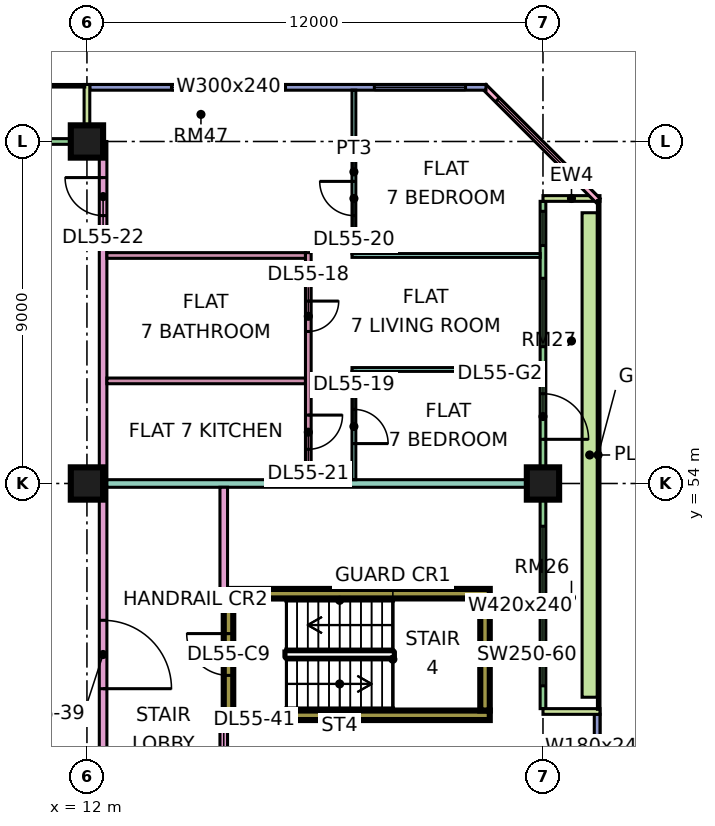
"""IFC4 building model, lengths in metres.
Left out: names, types, materials, properties, quantities, classifications, styles, units other than length and angle.
Written with IfcOpenShell. Run it as: python <this file> out.ifc"""

import sys

from ifc_helpers import new_model, si_unit, direction, frame, frame_2d, origin, origin_2d, place, context, subcontext, project, spatial, rectangle, extrude, element, fill, save


model = new_model("IFC4")
c1 = context("Model", 3, precision=1e-05, world=origin(), true_north=direction((0.0, 1.0)))
c2 = subcontext(c1, "Body", "Model", "MODEL_VIEW")
j1 = project(units=[si_unit("LENGTHUNIT", "METRE"), si_unit("PLANEANGLEUNIT", "RADIAN")], contexts=[c1])
p1 = place(None, origin())
s1 = spatial("IfcSite", under=j1, at=p1, CompositionType="ELEMENT")
p2 = place(p1, origin())
s2 = spatial("IfcBuilding", under=s1, at=p2, CompositionType="ELEMENT")
p3 = place(p2, frame((0.0, 0.0, 234.15)))
s3 = spatial("IfcBuildingStorey", under=s2, at=p3, CompositionType="ELEMENT", Elevation=234.15)
for number, where, z_axis, x_axis in (
    (1, (12.0, 54.0, 0.0), (0.0, 0.0, 1.0), (1.0, 0.0, 0.0)),
    (2, (12.0, 63.0, 0.0), (0.0, 0.0, 1.0), (1.0, 0.0, 0.0)),
    (3, (24.0, 54.0, 0.0), (0.0, 0.0, 1.0), (1.0, 0.0, 0.0)),
):
    element("IfcColumn", number, at=place(p3, frame(where, z_axis=z_axis, x_axis=x_axis)), inside=s3, PredefinedType="COLUMN", context=c2, shape_type="SweptSolid", body=[
        extrude(rectangle(XDim=0.85, YDim=0.85, at=origin_2d()), origin(), (0.0, 0.0, 1.0), 3.75),
    ])
for number, where, z_axis, x_axis in (
    (4, (15.6, 47.9, 0.0), (0.0, 0.0, 1.0), (1.0, 0.0, 0.0)),
    (5, (15.6, 51.1, 0.0), (0.0, 0.0, 1.0), (1.0, 0.0, 0.0)),
):
    element("IfcWall", number, at=place(p3, frame(where, z_axis=z_axis, x_axis=x_axis)), inside=s3, PredefinedType="SHEAR", context=c2, shape_type="SweptSolid", body=[
        extrude(rectangle(XDim=7.0, YDim=0.25, at=frame_2d((3.5, 0.0))), origin(), (0.0, 0.0, 1.0), 3.75),
    ])
p4 = place(p3, frame((15.725, 48.025, 0.0), z_axis=(0.0, 0.0, 1.0), x_axis=(0.0, 1.0, 0.0)))
e6 = element("IfcWall", 6, at=p4, inside=s3, PredefinedType="SHEAR", context=c2, shape_type="SweptSolid", body=[
    extrude(rectangle(XDim=2.95, YDim=0.25, at=frame_2d((1.475, 0.0))), origin(), (0.0, 0.0, 1.0), 3.75),
])
p5 = place(p4, frame((0.925, 0.0, 0.0)))
e7 = element("IfcOpeningElement", 7, at=p5, cuts=e6, PredefinedType="OPENING", context=c2, shape_type="SweptSolid", body=[
    extrude(rectangle(XDim=1.1, YDim=2.2, at=frame_2d((0.55, 1.1))), frame((0.0, 0.135, 0.0), z_axis=(0.0, -1.0, 0.0), x_axis=(1.0, 0.0, 0.0)), (0.0, 0.0, 1.0), 0.27),
])
p6 = place(p3, frame((22.475, 48.025, 0.0), z_axis=(0.0, 0.0, 1.0), x_axis=(0.0, 1.0, 0.0)))
e8 = element("IfcWall", 8, at=p6, inside=s3, PredefinedType="SHEAR", context=c2, shape_type="SweptSolid", body=[
    extrude(rectangle(XDim=2.95, YDim=0.25, at=frame_2d((1.475, 0.0))), origin(), (0.0, 0.0, 1.0), 3.75),
])
p7 = place(p3, frame((25.425, 40.5, 0.0), z_axis=(0.0, 0.0, 1.0), x_axis=(0.0, 1.0, 0.0)))
e9 = element("IfcWall", 9, at=p7, inside=s3, PredefinedType="SOLIDWALL", context=c2, shape_type="SweptSolid", body=[
    extrude(rectangle(XDim=7.425, YDim=0.15, at=frame_2d((3.712, 0.0))), origin(), (0.0, 0.0, 1.0), 3.35),
])
p8 = place(p7, frame((0.3, 0.0, 0.45)))
e10 = element("IfcOpeningElement", 10, at=p8, cuts=e9, PredefinedType="OPENING", context=c2, shape_type="SweptSolid", body=[
    extrude(rectangle(XDim=0.9, YDim=2.4, at=frame_2d((0.45, 1.2))), frame((0.0, 0.085, 0.0), z_axis=(0.0, -1.0, 0.0), x_axis=(1.0, 0.0, 0.0)), (0.0, 0.0, 1.0), 0.17),
])
p9 = place(p7, frame((2.1, 0.0, 0.45)))
e11 = element("IfcOpeningElement", 11, at=p9, cuts=e9, PredefinedType="OPENING", context=c2, shape_type="SweptSolid", body=[
    extrude(rectangle(XDim=1.8, YDim=2.4, at=frame_2d((0.9, 1.2))), frame((0.0, 0.085, 0.0), z_axis=(0.0, -1.0, 0.0), x_axis=(1.0, 0.0, 0.0)), (0.0, 0.0, 1.0), 0.17),
])
p10 = place(p7, frame((5.062, 0.0, 0.45)))
e12 = element("IfcOpeningElement", 12, at=p10, cuts=e9, PredefinedType="OPENING", context=c2, shape_type="SweptSolid", body=[
    extrude(rectangle(XDim=1.8, YDim=2.4, at=frame_2d((0.9, 1.2))), frame((0.0, 0.085, 0.0), z_axis=(0.0, -1.0, 0.0), x_axis=(1.0, 0.0, 0.0)), (0.0, 0.0, 1.0), 0.17),
])
p11 = place(p3, frame((24.0, 48.075, 0.0), z_axis=(0.0, 0.0, 1.0), x_axis=(0.0, 1.0, 0.0)))
e13 = element("IfcWall", 13, at=p11, inside=s3, PredefinedType="SOLIDWALL", context=c2, shape_type="SweptSolid", body=[
    extrude(rectangle(XDim=13.35, YDim=0.15, at=frame_2d((6.675, 0.0))), origin(), (0.0, 0.0, 1.0), 3.35),
])
p12 = place(p11, frame((0.6, 0.0, 0.45)))
e14 = element("IfcOpeningElement", 14, at=p12, cuts=e13, PredefinedType="OPENING", context=c2, shape_type="SweptSolid", body=[
    extrude(rectangle(XDim=4.2, YDim=2.4, at=frame_2d((2.1, 1.2))), frame((0.0, 0.085, 0.0), z_axis=(0.0, -1.0, 0.0), x_axis=(1.0, 0.0, 0.0)), (0.0, 0.0, 1.0), 0.17),
])
p13 = place(p11, frame((7.087, 0.0, 0.0)))
e15 = element("IfcOpeningElement", 15, at=p13, cuts=e13, PredefinedType="OPENING", context=c2, shape_type="SweptSolid", body=[
    extrude(rectangle(XDim=1.2, YDim=2.4, at=frame_2d((0.6, 1.2))), frame((0.0, 0.085, 0.0), z_axis=(0.0, -1.0, 0.0), x_axis=(1.0, 0.0, 0.0)), (0.0, 0.0, 1.0), 0.17),
])
p14 = place(p11, frame((9.525, 0.0, 0.45)))
e16 = element("IfcOpeningElement", 16, at=p14, cuts=e13, PredefinedType="OPENING", context=c2, shape_type="SweptSolid", body=[
    extrude(rectangle(XDim=1.8, YDim=2.4, at=frame_2d((0.9, 1.2))), frame((0.0, 0.085, 0.0), z_axis=(0.0, -1.0, 0.0), x_axis=(1.0, 0.0, 0.0)), (0.0, 0.0, 1.0), 0.17),
])
p15 = place(p11, frame((12.188, 0.0, 0.45)))
e17 = element("IfcOpeningElement", 17, at=p15, cuts=e13, PredefinedType="OPENING", context=c2, shape_type="SweptSolid", body=[
    extrude(rectangle(XDim=0.9, YDim=2.4, at=frame_2d((0.45, 1.2))), frame((0.0, 0.085, 0.0), z_axis=(0.0, -1.0, 0.0), x_axis=(1.0, 0.0, 0.0)), (0.0, 0.0, 1.0), 0.17),
])
for number, where, z_axis, x_axis in (
    (18, (25.5, 48.0, 0.0), (0.0, 0.0, 1.0), (-1.0, 0.0, 0.0)),
    (19, (25.5, 61.5, 0.0), (0.0, 0.0, 1.0), (-1.0, 0.0, 0.0)),
):
    element("IfcWall", number, at=place(p3, frame(where, z_axis=z_axis, x_axis=x_axis)), inside=s3, PredefinedType="SOLIDWALL", context=c2, shape_type="SweptSolid", body=[
        extrude(rectangle(XDim=1.5, YDim=0.15, at=frame_2d((0.75, 0.0))), origin(), (0.0, 0.0, 1.0), 3.35),
    ])
p16 = place(p3, frame((25.447, 61.447, 0.0), z_axis=(0.0, 0.0, 1.0), x_axis=(-0.707106781187, 0.707106781187, 0.0)))
e20 = element("IfcWall", 20, at=p16, inside=s3, PredefinedType="SOLIDWALL", context=c2, shape_type="SweptSolid", body=[
    extrude(rectangle(XDim=4.243, YDim=0.15, at=frame_2d((2.121, 0.0))), origin(), (0.0, 0.0, 1.0), 3.35),
])
p17 = place(p16, frame((0.744, 0.0, 0.45)))
e21 = element("IfcOpeningElement", 21, at=p17, cuts=e20, PredefinedType="OPENING", context=c2, shape_type="SweptSolid", body=[
    extrude(rectangle(XDim=3.0, YDim=2.4, at=frame_2d((1.5, 1.2))), frame((0.0, 0.085, 0.0), z_axis=(0.0, -1.0, 0.0), x_axis=(1.0, 0.0, 0.0)), (0.0, 0.0, 1.0), 0.17),
])
p18 = place(p3, frame((22.5, 64.425, 0.0), z_axis=(0.0, 0.0, 1.0), x_axis=(-1.0, 0.0, 0.0)))
e22 = element("IfcWall", 22, at=p18, inside=s3, PredefinedType="SOLIDWALL", context=c2, shape_type="SweptSolid", body=[
    extrude(rectangle(XDim=10.425, YDim=0.15, at=frame_2d((5.212, 0.0))), origin(), (0.0, 0.0, 1.0), 3.35),
])
p19 = place(p18, frame((0.538, 0.0, 0.45)))
e23 = element("IfcOpeningElement", 23, at=p19, cuts=e22, PredefinedType="OPENING", context=c2, shape_type="SweptSolid", body=[
    extrude(rectangle(XDim=2.4, YDim=2.4, at=frame_2d((1.2, 1.2))), frame((0.0, 0.085, 0.0), z_axis=(0.0, -1.0, 0.0), x_axis=(1.0, 0.0, 0.0)), (0.0, 0.0, 1.0), 0.17),
])
p20 = place(p18, frame((5.275, 0.0, 0.45)))
e24 = element("IfcOpeningElement", 24, at=p20, cuts=e22, PredefinedType="OPENING", context=c2, shape_type="SweptSolid", body=[
    extrude(rectangle(XDim=3.0, YDim=2.4, at=frame_2d((1.5, 1.2))), frame((0.0, 0.085, 0.0), z_axis=(0.0, -1.0, 0.0), x_axis=(1.0, 0.0, 0.0)), (0.0, 0.0, 1.0), 0.17),
])
p21 = place(p3, frame((11.925, 63.0, 0.0), z_axis=(0.0, 0.0, 1.0), x_axis=(-1.0, 0.0, 0.0)))
e25 = element("IfcWall", 25, at=p21, inside=s3, PredefinedType="SOLIDWALL", context=c2, shape_type="SweptSolid", body=[
    extrude(rectangle(XDim=10.35, YDim=0.15, at=frame_2d((5.175, 0.0))), origin(), (0.0, 0.0, 1.0), 3.35),
])
p22 = place(p21, frame((2.775, 0.0, 0.45)))
e26 = element("IfcOpeningElement", 26, at=p22, cuts=e25, PredefinedType="OPENING", context=c2, shape_type="SweptSolid", body=[
    extrude(rectangle(XDim=2.4, YDim=2.4, at=frame_2d((1.2, 1.2))), frame((0.0, 0.085, 0.0), z_axis=(0.0, -1.0, 0.0), x_axis=(1.0, 0.0, 0.0)), (0.0, 0.0, 1.0), 0.17),
])
p23 = place(p21, frame((7.087, 0.0, 0.0)))
e27 = element("IfcOpeningElement", 27, at=p23, cuts=e25, PredefinedType="OPENING", context=c2, shape_type="SweptSolid", body=[
    extrude(rectangle(XDim=1.8, YDim=2.4, at=frame_2d((0.9, 1.2))), frame((0.0, 0.085, 0.0), z_axis=(0.0, -1.0, 0.0), x_axis=(1.0, 0.0, 0.0)), (0.0, 0.0, 1.0), 0.17),
])
p24 = place(p3, frame((12.0, 64.5, 0.0), z_axis=(0.0, 0.0, 1.0), x_axis=(0.0, -1.0, 0.0)))
e28 = element("IfcWall", 28, at=p24, inside=s3, PredefinedType="SOLIDWALL", context=c2, shape_type="SweptSolid", body=[
    extrude(rectangle(XDim=1.5, YDim=0.15, at=frame_2d((0.75, 0.0))), origin(), (0.0, 0.0, 1.0), 3.35),
])
p25 = place(p3, frame((25.229, 48.375, 0.0), z_axis=(0.0, 0.0, 1.0), x_axis=(0.0, 1.0, 0.0)))
e29 = element("IfcWall", 29, at=p25, inside=s3, PredefinedType="SOLIDWALL", context=c2, shape_type="SweptSolid", body=[
    extrude(rectangle(XDim=12.75, YDim=0.4, at=frame_2d((6.375, 0.0))), origin(), (0.0, 0.0, 1.0), 0.7),
])
p26 = place(p3, frame((12.425, 20.0, 0.0), z_axis=(0.0, 0.0, 1.0), x_axis=(0.0, 1.0, 0.0)))
e30 = element("IfcWall", 30, at=p26, inside=s3, PredefinedType="PARTITIONING", context=c2, shape_type="SweptSolid", body=[
    extrude(rectangle(XDim=43.0, YDim=0.2, at=frame_2d((21.5, 0.0))), origin(), (0.0, 0.0, 1.0), 3.35),
])
p27 = place(p26, frame((5.95, 0.0, 0.0)))
e31 = element("IfcOpeningElement", 31, at=p27, cuts=e30, PredefinedType="OPENING", context=c2, shape_type="SweptSolid", body=[
    extrude(rectangle(XDim=1.0, YDim=2.1, at=frame_2d((0.5, 1.05))), frame((0.0, 0.11, 0.0), z_axis=(0.0, -1.0, 0.0), x_axis=(1.0, 0.0, 0.0)), (0.0, 0.0, 1.0), 0.22),
])
p28 = place(p26, frame((12.0, 0.0, 0.0)))
e32 = element("IfcOpeningElement", 32, at=p28, cuts=e30, PredefinedType="OPENING", context=c2, shape_type="SweptSolid", body=[
    extrude(rectangle(XDim=1.0, YDim=2.1, at=frame_2d((0.5, 1.05))), frame((0.0, 0.11, 0.0), z_axis=(0.0, -1.0, 0.0), x_axis=(1.0, 0.0, 0.0)), (0.0, 0.0, 1.0), 0.22),
])
p29 = place(p26, frame((16.9, 0.0, 0.0)))
e33 = element("IfcOpeningElement", 33, at=p29, cuts=e30, PredefinedType="OPENING", context=c2, shape_type="SweptSolid", body=[
    extrude(rectangle(XDim=1.0, YDim=2.1, at=frame_2d((0.5, 1.05))), frame((0.0, 0.11, 0.0), z_axis=(0.0, -1.0, 0.0), x_axis=(1.0, 0.0, 0.0)), (0.0, 0.0, 1.0), 0.22),
])
p30 = place(p26, frame((41.05, 0.0, 0.0)))
e34 = element("IfcOpeningElement", 34, at=p30, cuts=e30, PredefinedType="OPENING", context=c2, shape_type="SweptSolid", body=[
    extrude(rectangle(XDim=1.0, YDim=2.1, at=frame_2d((0.5, 1.05))), frame((0.0, 0.11, 0.0), z_axis=(0.0, -1.0, 0.0), x_axis=(1.0, 0.0, 0.0)), (0.0, 0.0, 1.0), 0.22),
])
p31 = place(p26, frame((1.15, 0.0, 0.0)))
e35 = element("IfcOpeningElement", 35, at=p31, cuts=e30, PredefinedType="OPENING", context=c2, shape_type="SweptSolid", body=[
    extrude(rectangle(XDim=1.8, YDim=2.1, at=frame_2d((0.9, 1.05))), frame((0.0, 0.11, 0.0), z_axis=(0.0, -1.0, 0.0), x_axis=(1.0, 0.0, 0.0)), (0.0, 0.0, 1.0), 0.22),
])
p32 = place(p26, frame((28.6, 0.0, 0.0)))
e36 = element("IfcOpeningElement", 36, at=p32, cuts=e30, PredefinedType="OPENING", context=c2, shape_type="SweptSolid", body=[
    extrude(rectangle(XDim=1.8, YDim=2.1, at=frame_2d((0.9, 1.05))), frame((0.0, 0.11, 0.0), z_axis=(0.0, -1.0, 0.0), x_axis=(1.0, 0.0, 0.0)), (0.0, 0.0, 1.0), 0.22),
])
p33 = place(p3, frame((12.525, 54.0, 0.0), z_axis=(0.0, 0.0, 1.0), x_axis=(1.0, 0.0, 0.0)))
e37 = element("IfcWall", 37, at=p33, inside=s3, PredefinedType="PARTITIONING", context=c2, shape_type="SweptSolid", body=[
    extrude(rectangle(XDim=11.401, YDim=0.2, at=frame_2d((5.701, 0.0))), origin(), (0.0, 0.0, 1.0), 3.35),
])
for number, where, z_axis, x_axis in (
    (38, (12.525, 56.7, 0.0), (0.0, 0.0, 1.0), (1.0, 0.0, 0.0)),
    (39, (12.525, 60.0, 0.0), (0.0, 0.0, 1.0), (1.0, 0.0, 0.0)),
):
    element("IfcWall", number, at=place(p3, frame(where, z_axis=z_axis, x_axis=x_axis)), inside=s3, PredefinedType="PARTITIONING", context=c2, shape_type="SweptSolid", body=[
        extrude(rectangle(XDim=5.225, YDim=0.15, at=frame_2d((2.613, 0.0))), origin(), (0.0, 0.0, 1.0), 3.35),
    ])
p34 = place(p3, frame((15.6, 45.1, 0.0), z_axis=(0.0, 0.0, 1.0), x_axis=(0.0, 1.0, 0.0)))
e40 = element("IfcWall", 40, at=p34, inside=s3, PredefinedType="PARTITIONING", context=c2, shape_type="SweptSolid", body=[
    extrude(rectangle(XDim=2.675, YDim=0.2, at=frame_2d((1.337, 0.0))), origin(), (0.0, 0.0, 1.0), 3.35),
])
p35 = place(p34, frame((0.8, 0.0, 0.0)))
e41 = element("IfcOpeningElement", 41, at=p35, cuts=e40, PredefinedType="OPENING", context=c2, shape_type="SweptSolid", body=[
    extrude(rectangle(XDim=1.0, YDim=2.1, at=frame_2d((0.5, 1.05))), frame((0.0, 0.11, 0.0), z_axis=(0.0, -1.0, 0.0), x_axis=(1.0, 0.0, 0.0)), (0.0, 0.0, 1.0), 0.22),
])
p36 = place(p3, frame((15.6, 51.225, 0.0), z_axis=(0.0, 0.0, 1.0), x_axis=(0.0, 1.0, 0.0)))
e42 = element("IfcWall", 42, at=p36, inside=s3, PredefinedType="PARTITIONING", context=c2, shape_type="SweptSolid", body=[
    extrude(rectangle(XDim=2.675, YDim=0.2, at=frame_2d((1.337, 0.0))), origin(), (0.0, 0.0, 1.0), 3.35),
])
p37 = place(p3, frame((17.825, 54.1, 0.0), z_axis=(0.0, 0.0, 1.0), x_axis=(0.0, 1.0, 0.0)))
e43 = element("IfcWall", 43, at=p37, inside=s3, PredefinedType="PARTITIONING", context=c2, shape_type="SweptSolid", body=[
    extrude(rectangle(XDim=5.975, YDim=0.15, at=frame_2d((2.987, 0.0))), origin(), (0.0, 0.0, 1.0), 3.35),
])
p38 = place(p37, frame((3.9, 0.0, 0.0)))
e44 = element("IfcOpeningElement", 44, at=p38, cuts=e43, PredefinedType="OPENING", context=c2, shape_type="SweptSolid", body=[
    extrude(rectangle(XDim=0.8, YDim=2.1, at=frame_2d((0.4, 1.05))), frame((0.0, 0.085, 0.0), z_axis=(0.0, -1.0, 0.0), x_axis=(1.0, 0.0, 0.0)), (0.0, 0.0, 1.0), 0.17),
])
p39 = place(p37, frame((0.8, 0.0, 0.0)))
e45 = element("IfcOpeningElement", 45, at=p39, cuts=e43, PredefinedType="OPENING", context=c2, shape_type="SweptSolid", body=[
    extrude(rectangle(XDim=0.9, YDim=2.1, at=frame_2d((0.45, 1.05))), frame((0.0, 0.085, 0.0), z_axis=(0.0, -1.0, 0.0), x_axis=(1.0, 0.0, 0.0)), (0.0, 0.0, 1.0), 0.17),
])
for number, where, z_axis, x_axis in (
    (46, (18.975, 57.0, 0.0), (0.0, 0.0, 1.0), (1.0, 0.0, 0.0)),
    (47, (18.975, 60.0, 0.0), (0.0, 0.0, 1.0), (1.0, 0.0, 0.0)),
):
    element("IfcWall", number, at=place(p3, frame(where, z_axis=z_axis, x_axis=x_axis)), inside=s3, PredefinedType="PARTITIONING", context=c2, shape_type="SweptSolid", body=[
        extrude(rectangle(XDim=4.951, YDim=0.1, at=frame_2d((2.476, 0.0))), origin(), (0.0, 0.0, 1.0), 3.35),
    ])
p40 = place(p3, frame((19.025, 54.1, 0.0), z_axis=(0.0, 0.0, 1.0), x_axis=(0.0, 1.0, 0.0)))
e48 = element("IfcWall", 48, at=p40, inside=s3, PredefinedType="PARTITIONING", context=c2, shape_type="SweptSolid", body=[
    extrude(rectangle(XDim=2.85, YDim=0.1, at=frame_2d((1.425, 0.0))), origin(), (0.0, 0.0, 1.0), 3.35),
])
p41 = place(p40, frame((0.95, 0.0, 0.0)))
e49 = element("IfcOpeningElement", 49, at=p41, cuts=e48, PredefinedType="OPENING", context=c2, shape_type="SweptSolid", body=[
    extrude(rectangle(XDim=0.9, YDim=2.1, at=frame_2d((0.45, 1.05))), frame((0.0, 0.06, 0.0), z_axis=(0.0, -1.0, 0.0), x_axis=(1.0, 0.0, 0.0)), (0.0, 0.0, 1.0), 0.12),
])
p42 = place(p3, frame((19.025, 60.05, 0.0), z_axis=(0.0, 0.0, 1.0), x_axis=(0.0, 1.0, 0.0)))
e50 = element("IfcWall", 50, at=p42, inside=s3, PredefinedType="PARTITIONING", context=c2, shape_type="SweptSolid", body=[
    extrude(rectangle(XDim=4.301, YDim=0.1, at=frame_2d((2.15, 0.0))), origin(), (0.0, 0.0, 1.0), 3.35),
])
p43 = place(p42, frame((1.0, 0.0, 0.0)))
e51 = element("IfcOpeningElement", 51, at=p43, cuts=e50, PredefinedType="OPENING", context=c2, shape_type="SweptSolid", body=[
    extrude(rectangle(XDim=0.9, YDim=2.1, at=frame_2d((0.45, 1.05))), frame((0.0, 0.06, 0.0), z_axis=(0.0, -1.0, 0.0), x_axis=(1.0, 0.0, 0.0)), (0.0, 0.0, 1.0), 0.12),
])
p44 = place(p10, origin())
e52 = element("IfcWindow", 52, at=p44, inside=s3, PartitioningType="SINGLE_PANEL", PredefinedType="WINDOW", context=c2, shape_type="SweptSolid", body=[
    extrude(rectangle(XDim=1.8, YDim=2.4, at=frame_2d((0.9, 1.2))), frame((0.0, 0.03, 0.0), z_axis=(0.0, -1.0, 0.0), x_axis=(1.0, 0.0, 0.0)), (0.0, 0.0, 1.0), 0.06),
])
fill(e12, e52)
p45 = place(p12, origin())
e53 = element("IfcWindow", 53, at=p45, inside=s3, PartitioningType="SINGLE_PANEL", PredefinedType="WINDOW", context=c2, shape_type="SweptSolid", body=[
    extrude(rectangle(XDim=4.2, YDim=2.4, at=frame_2d((2.1, 1.2))), frame((0.0, 0.03, 0.0), z_axis=(0.0, -1.0, 0.0), x_axis=(1.0, 0.0, 0.0)), (0.0, 0.0, 1.0), 0.06),
])
fill(e14, e53)
p46 = place(p13, frame((1.2, 0.0, 0.0), z_axis=(0.0, 0.0, 1.0), x_axis=(-1.0, 0.0, 0.0)))
e54 = element("IfcDoor", 54, at=p46, inside=s3, OperationType="DOUBLE_DOOR_SINGLE_SWING", PredefinedType="DOOR", context=c2, shape_type="SweptSolid", body=[
    extrude(rectangle(XDim=1.2, YDim=2.4, at=frame_2d((0.6, 1.2))), frame((0.0, 0.025, 0.0), z_axis=(0.0, -1.0, 0.0), x_axis=(1.0, 0.0, 0.0)), (0.0, 0.0, 1.0), 0.05),
])
fill(e15, e54)
p47 = place(p14, origin())
e55 = element("IfcWindow", 55, at=p47, inside=s3, PartitioningType="SINGLE_PANEL", PredefinedType="WINDOW", context=c2, shape_type="SweptSolid", body=[
    extrude(rectangle(XDim=1.8, YDim=2.4, at=frame_2d((0.9, 1.2))), frame((0.0, 0.03, 0.0), z_axis=(0.0, -1.0, 0.0), x_axis=(1.0, 0.0, 0.0)), (0.0, 0.0, 1.0), 0.06),
])
fill(e16, e55)
p48 = place(p15, origin())
e56 = element("IfcWindow", 56, at=p48, inside=s3, PartitioningType="SINGLE_PANEL", PredefinedType="WINDOW", context=c2, shape_type="SweptSolid", body=[
    extrude(rectangle(XDim=0.9, YDim=2.4, at=frame_2d((0.45, 1.2))), frame((0.0, 0.03, 0.0), z_axis=(0.0, -1.0, 0.0), x_axis=(1.0, 0.0, 0.0)), (0.0, 0.0, 1.0), 0.06),
])
fill(e17, e56)
p49 = place(p17, origin())
e57 = element("IfcWindow", 57, at=p49, inside=s3, PartitioningType="SINGLE_PANEL", PredefinedType="WINDOW", context=c2, shape_type="SweptSolid", body=[
    extrude(rectangle(XDim=3.0, YDim=2.4, at=frame_2d((1.5, 1.2))), frame((0.0, 0.03, 0.0), z_axis=(0.0, -1.0, 0.0), x_axis=(1.0, 0.0, 0.0)), (0.0, 0.0, 1.0), 0.06),
])
fill(e21, e57)
p50 = place(p19, origin())
e58 = element("IfcWindow", 58, at=p50, inside=s3, PartitioningType="SINGLE_PANEL", PredefinedType="WINDOW", context=c2, shape_type="SweptSolid", body=[
    extrude(rectangle(XDim=2.4, YDim=2.4, at=frame_2d((1.2, 1.2))), frame((0.0, 0.03, 0.0), z_axis=(0.0, -1.0, 0.0), x_axis=(1.0, 0.0, 0.0)), (0.0, 0.0, 1.0), 0.06),
])
fill(e23, e58)
p51 = place(p20, origin())
e59 = element("IfcWindow", 59, at=p51, inside=s3, PartitioningType="SINGLE_PANEL", PredefinedType="WINDOW", context=c2, shape_type="SweptSolid", body=[
    extrude(rectangle(XDim=3.0, YDim=2.4, at=frame_2d((1.5, 1.2))), frame((0.0, 0.03, 0.0), z_axis=(0.0, -1.0, 0.0), x_axis=(1.0, 0.0, 0.0)), (0.0, 0.0, 1.0), 0.06),
])
fill(e24, e59)
p52 = place(p5, frame((1.1, 0.0, 0.0), z_axis=(0.0, 0.0, 1.0), x_axis=(-1.0, 0.0, 0.0)))
e60 = element("IfcDoor", 60, at=p52, inside=s3, OperationType="SINGLE_SWING_RIGHT", PredefinedType="DOOR", context=c2, shape_type="SweptSolid", body=[
    extrude(rectangle(XDim=1.1, YDim=2.2, at=frame_2d((0.55, 1.1))), frame((0.0, 0.025, 0.0), z_axis=(0.0, -1.0, 0.0), x_axis=(1.0, 0.0, 0.0)), (0.0, 0.0, 1.0), 0.05),
])
fill(e7, e60)
p53 = place(p38, origin())
e61 = element("IfcDoor", 61, at=p53, inside=s3, OperationType="SINGLE_SWING_RIGHT", PredefinedType="DOOR", context=c2, shape_type="SweptSolid", body=[
    extrude(rectangle(XDim=0.8, YDim=2.1, at=frame_2d((0.4, 1.05))), frame((0.0, 0.025, 0.0), z_axis=(0.0, -1.0, 0.0), x_axis=(1.0, 0.0, 0.0)), (0.0, 0.0, 1.0), 0.05),
])
fill(e44, e61)
p54 = place(p41, frame((0.9, 0.0, 0.0), z_axis=(0.0, 0.0, 1.0), x_axis=(-1.0, 0.0, 0.0)))
e62 = element("IfcDoor", 62, at=p54, inside=s3, OperationType="SINGLE_SWING_LEFT", PredefinedType="DOOR", context=c2, shape_type="SweptSolid", body=[
    extrude(rectangle(XDim=0.9, YDim=2.1, at=frame_2d((0.45, 1.05))), frame((0.0, 0.025, 0.0), z_axis=(0.0, -1.0, 0.0), x_axis=(1.0, 0.0, 0.0)), (0.0, 0.0, 1.0), 0.05),
])
fill(e49, e62)
p55 = place(p43, frame((0.9, 0.0, 0.0), z_axis=(0.0, 0.0, 1.0), x_axis=(-1.0, 0.0, 0.0)))
e63 = element("IfcDoor", 63, at=p55, inside=s3, OperationType="SINGLE_SWING_RIGHT", PredefinedType="DOOR", context=c2, shape_type="SweptSolid", body=[
    extrude(rectangle(XDim=0.9, YDim=2.1, at=frame_2d((0.45, 1.05))), frame((0.0, 0.025, 0.0), z_axis=(0.0, -1.0, 0.0), x_axis=(1.0, 0.0, 0.0)), (0.0, 0.0, 1.0), 0.05),
])
fill(e51, e63)
p56 = place(p39, origin())
e64 = element("IfcDoor", 64, at=p56, inside=s3, OperationType="SINGLE_SWING_RIGHT", PredefinedType="DOOR", context=c2, shape_type="SweptSolid", body=[
    extrude(rectangle(XDim=0.9, YDim=2.1, at=frame_2d((0.45, 1.05))), frame((0.0, 0.025, 0.0), z_axis=(0.0, -1.0, 0.0), x_axis=(1.0, 0.0, 0.0)), (0.0, 0.0, 1.0), 0.05),
])
fill(e45, e64)
p57 = place(p30, frame((1.0, 0.0, 0.0), z_axis=(0.0, 0.0, 1.0), x_axis=(-1.0, 0.0, 0.0)))
e65 = element("IfcDoor", 65, at=p57, inside=s3, OperationType="SINGLE_SWING_RIGHT", PredefinedType="DOOR", context=c2, shape_type="SweptSolid", body=[
    extrude(rectangle(XDim=1.0, YDim=2.1, at=frame_2d((0.5, 1.05))), frame((0.0, 0.025, 0.0), z_axis=(0.0, -1.0, 0.0), x_axis=(1.0, 0.0, 0.0)), (0.0, 0.0, 1.0), 0.05),
])
fill(e34, e65)
p58 = place(p32, frame((1.8, 0.0, 0.0), z_axis=(0.0, 0.0, 1.0), x_axis=(-1.0, 0.0, 0.0)))
e66 = element("IfcDoor", 66, at=p58, inside=s3, OperationType="DOUBLE_DOOR_SINGLE_SWING", PredefinedType="DOOR", context=c2, shape_type="SweptSolid", body=[
    extrude(rectangle(XDim=1.8, YDim=2.1, at=frame_2d((0.9, 1.05))), frame((0.0, 0.025, 0.0), z_axis=(0.0, -1.0, 0.0), x_axis=(1.0, 0.0, 0.0)), (0.0, 0.0, 1.0), 0.05),
])
fill(e36, e66)
save(model, sys.argv[1])
